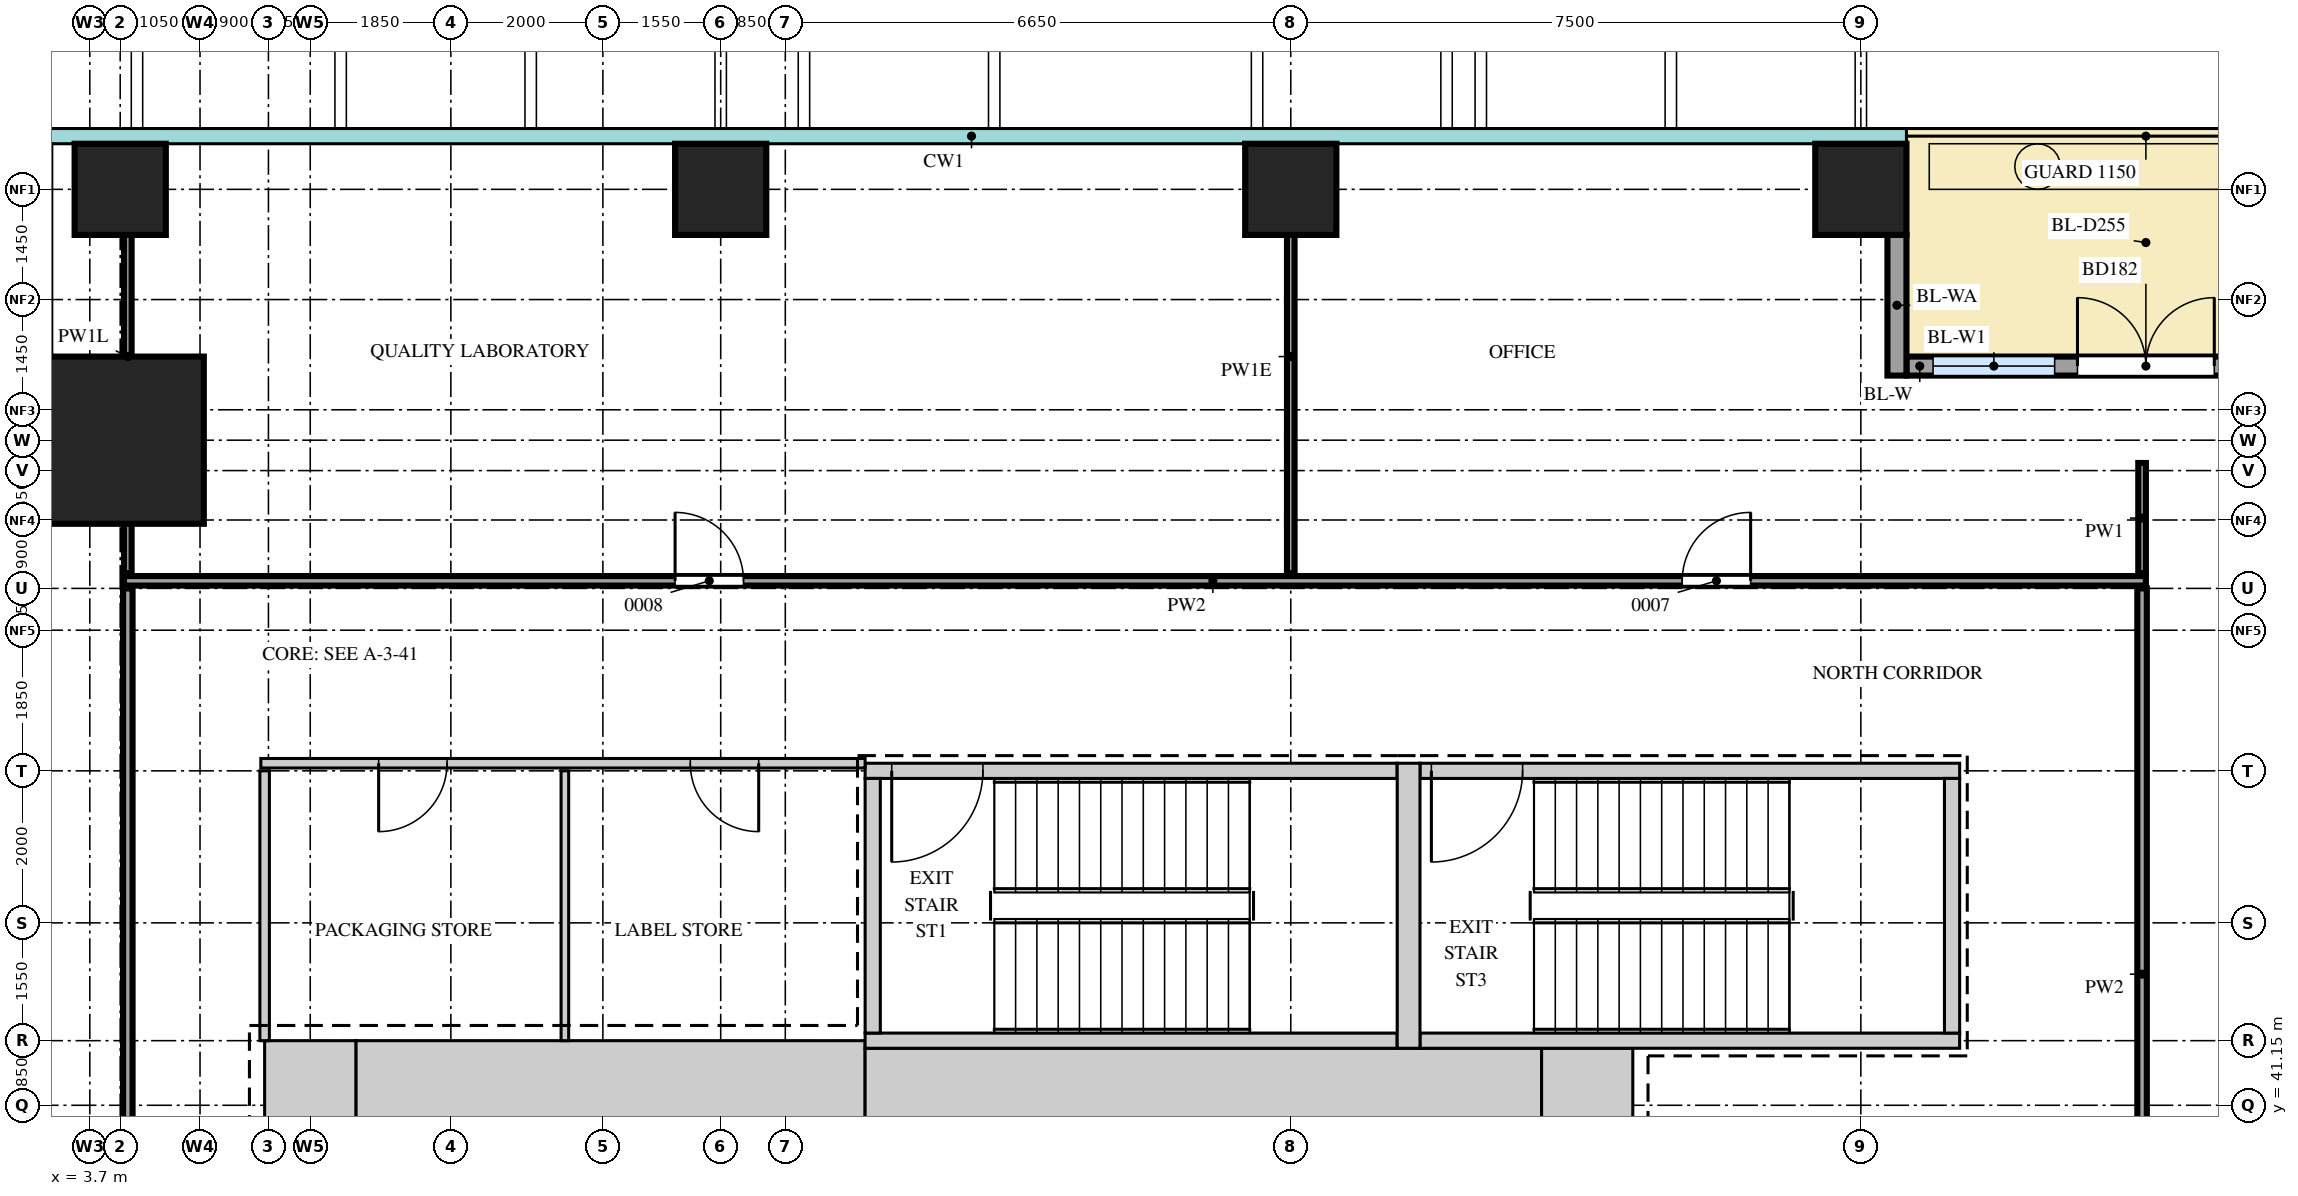
"""IFC4 building model, lengths in metres.
Left out: names, types, materials, properties, quantities, classifications, styles, units other than length and angle.
Written with IfcOpenShell. Run it as: python <this file> out.ifc"""

import sys

from ifc_helpers import new_model, si_unit, direction, frame, frame_2d, origin, origin_2d, place, context, subcontext, project, spatial, rectangle, extrude, source, transform, mapped, element, fill, save


model = new_model("IFC4")
c1 = context("Model", 3, precision=1e-05, world=origin(), true_north=direction((0.0, 1.0)))
c2 = subcontext(c1, "Body", "Model", "MODEL_VIEW")
j1 = project(units=[si_unit("LENGTHUNIT", "METRE"), si_unit("PLANEANGLEUNIT", "RADIAN")], contexts=[c1])
p1 = place(None, origin())
s1 = spatial("IfcSite", under=j1, at=p1, CompositionType="ELEMENT")
p2 = place(p1, origin())
s2 = spatial("IfcBuilding", under=s1, at=p2, CompositionType="ELEMENT")
p3 = place(p2, frame((0.0, 0.0, 87.0)))
s3 = spatial("IfcBuildingStorey", under=s2, at=p3, CompositionType="ELEMENT", Elevation=87.0)
m1 = source(origin(), c2, "Body", "SweptSolid", [
    extrude(rectangle(XDim=6.7, YDim=1.2, at=frame_2d((3.35, 0.0))), origin(), (0.0, 0.0, 1.0), 4.2),
])
p4 = place(p3, frame((7.2, 41.4, 0.0), z_axis=(0.0, 0.0, 1.0), x_axis=(1.0, 0.0, 0.0)))
e1 = element("IfcWall", 1, at=p4, inside=s3, PredefinedType="SHEAR", context=c2, shape_type="MappedRepresentation", body=[
    mapped(m1, transform((0.0, 0.0, 0.0))),
])
m2 = source(origin(), c2, "Body", "SweptSolid", [
    extrude(rectangle(XDim=8.9, YDim=1.1, at=frame_2d((4.45, 0.0))), origin(), (0.0, 0.0, 1.0), 4.2),
])
p5 = place(p3, frame((13.9, 41.35, 0.0), z_axis=(0.0, 0.0, 1.0), x_axis=(1.0, 0.0, 0.0)))
e2 = element("IfcWall", 2, at=p5, inside=s3, PredefinedType="SHEAR", context=c2, shape_type="MappedRepresentation", body=[
    mapped(m2, transform((0.0, 0.0, 0.0))),
])
m3 = source(origin(), c2, "Body", "SweptSolid", [
    extrude(rectangle(XDim=1.2, YDim=1.1, at=frame_2d((0.6, 0.0))), origin(), (0.0, 0.0, 1.0), 4.2),
])
p6 = place(p3, frame((22.8, 41.35, 0.0), z_axis=(0.0, 0.0, 1.0), x_axis=(1.0, 0.0, 0.0)))
e3 = element("IfcWall", 3, at=p6, inside=s3, PredefinedType="SHEAR", context=c2, shape_type="MappedRepresentation", body=[
    mapped(m3, transform((0.0, 0.0, 0.0))),
])
m4 = source(origin(), c2, "Body", "SweptSolid", [
    extrude(rectangle(XDim=1.2, YDim=1.2, at=frame_2d((0.6, 0.0))), origin(), (0.0, 0.0, 1.0), 4.2),
])
p7 = place(p3, frame((6.0, 41.4, 0.0), z_axis=(0.0, 0.0, 1.0), x_axis=(1.0, 0.0, 0.0)))
e4 = element("IfcWall", 4, at=p7, inside=s3, PredefinedType="SHEAR", context=c2, shape_type="MappedRepresentation", body=[
    mapped(m4, transform((0.0, 0.0, 0.0))),
])
m5 = source(origin(), c2, "Body", "SweptSolid", [
    extrude(rectangle(XDim=7.0, YDim=0.2, at=frame_2d((3.5, 0.0))), origin(), (0.0, 0.0, 1.0), 4.2),
])
p8 = place(p3, frame((13.9, 45.55, 0.0), z_axis=(0.0, 0.0, 1.0), x_axis=(1.0, 0.0, 0.0)))
e5 = element("IfcWall", 5, at=p8, inside=s3, PredefinedType="SHEAR", context=c2, shape_type="MappedRepresentation", body=[
    mapped(m5, transform((0.0, 0.0, 0.0))),
])
m6 = source(origin(), c2, "Body", "SweptSolid", [
    extrude(rectangle(XDim=1.2, YDim=2.1, at=frame_2d((0.6, 1.05))), frame((0.0, 0.11, 0.0), z_axis=(0.0, -1.0, 0.0), x_axis=(1.0, 0.0, 0.0)), (0.0, 0.0, 1.0), 0.22),
])
p9 = place(p8, frame((0.35, 0.0, 0.0)))
e6 = element("IfcOpeningElement", 6, at=p9, cuts=e5, PredefinedType="OPENING", context=c2, shape_type="MappedRepresentation", body=[
    mapped(m6, transform((0.0, 0.0, 0.0))),
])
p10 = place(p3, frame((13.9, 42.0, 0.0), z_axis=(0.0, 0.0, 1.0), x_axis=(1.0, 0.0, 0.0)))
e7 = element("IfcWall", 7, at=p10, inside=s3, PredefinedType="SHEAR", context=c2, shape_type="MappedRepresentation", body=[
    mapped(m5, transform((0.0, 0.0, 0.0))),
])
m7 = source(origin(), c2, "Body", "SweptSolid", [
    extrude(rectangle(XDim=7.1, YDim=0.2, at=frame_2d((3.55, 0.0))), origin(), (0.0, 0.0, 1.0), 4.2),
])
p11 = place(p3, frame((21.2, 45.55, 0.0), z_axis=(0.0, 0.0, 1.0), x_axis=(1.0, 0.0, 0.0)))
e8 = element("IfcWall", 8, at=p11, inside=s3, PredefinedType="SHEAR", context=c2, shape_type="MappedRepresentation", body=[
    mapped(m7, transform((0.0, 0.0, 0.0))),
])
p12 = place(p11, frame((0.15, 0.0, 0.0)))
e9 = element("IfcOpeningElement", 9, at=p12, cuts=e8, PredefinedType="OPENING", context=c2, shape_type="MappedRepresentation", body=[
    mapped(m6, transform((0.0, 0.0, 0.0))),
])
p13 = place(p3, frame((21.2, 42.0, 0.0), z_axis=(0.0, 0.0, 1.0), x_axis=(1.0, 0.0, 0.0)))
e10 = element("IfcWall", 10, at=p13, inside=s3, PredefinedType="SHEAR", context=c2, shape_type="MappedRepresentation", body=[
    mapped(m7, transform((0.0, 0.0, 0.0))),
])
m8 = source(origin(), c2, "Body", "SweptSolid", [
    extrude(rectangle(XDim=3.75, YDim=0.3, at=frame_2d((1.875, 0.0))), origin(), (0.0, 0.0, 1.0), 4.2),
])
p14 = place(p3, frame((21.05, 41.9, 0.0), z_axis=(0.0, 0.0, 1.0), x_axis=(0.0, 1.0, 0.0)))
e11 = element("IfcWall", 11, at=p14, inside=s3, PredefinedType="SHEAR", context=c2, shape_type="MappedRepresentation", body=[
    mapped(m8, transform((0.0, 0.0, 0.0))),
])
m9 = source(origin(), c2, "Body", "SweptSolid", [
    extrude(rectangle(XDim=3.35, YDim=0.2, at=frame_2d((1.675, 0.0))), origin(), (0.0, 0.0, 1.0), 4.2),
])
for number, where, z_axis, x_axis in (
    (12, (14.0, 42.1, 0.0), (0.0, 0.0, 1.0), (0.0, 1.0, 0.0)),
    (13, (28.2, 42.1, 0.0), (0.0, 0.0, 1.0), (0.0, 1.0, 0.0)),
):
    element("IfcWall", number, at=place(p3, frame(where, z_axis=z_axis, x_axis=x_axis)), inside=s3, PredefinedType="SHEAR", context=c2, shape_type="MappedRepresentation", body=[
        mapped(m9, transform((0.0, 0.0, 0.0))),
    ])
m10 = source(origin(), c2, "Body", "SweptSolid", [
    extrude(rectangle(XDim=2.2, YDim=2.2, at=origin_2d()), origin(), (0.0, 0.0, 1.0), 4.5),
])
p15 = place(p3, frame((4.1, 49.9, 0.0), z_axis=(0.0, 0.0, 1.0), x_axis=(1.0, 0.0, 0.0)))
e14 = element("IfcColumn", 14, at=p15, inside=s3, PredefinedType="COLUMN", context=c2, shape_type="MappedRepresentation", body=[
    mapped(m10, transform((0.0, 0.0, 0.0))),
])
m11 = source(origin(), c2, "Body", "SweptSolid", [
    extrude(rectangle(XDim=1.2, YDim=1.2, at=origin_2d()), origin(), (0.0, 0.0, 1.0), 4.2),
])
for number, where, z_axis, x_axis in (
    (15, (4.1, 53.2, 0.0), (0.0, 0.0, 1.0), (1.0, 0.0, 0.0)),
    (16, (12.0, 53.2, 0.0), (0.0, 0.0, 1.0), (1.0, 0.0, 0.0)),
    (17, (19.5, 53.2, 0.0), (0.0, 0.0, 1.0), (1.0, 0.0, 0.0)),
    (18, (27.0, 53.2, 0.0), (0.0, 0.0, 1.0), (1.0, 0.0, 0.0)),
):
    element("IfcColumn", number, at=place(p3, frame(where, z_axis=z_axis, x_axis=x_axis)), inside=s3, PredefinedType="COLUMN", context=c2, shape_type="MappedRepresentation", body=[
        mapped(m11, transform((0.0, 0.0, 0.0))),
    ])
m12 = source(origin(), c2, "Body", "SweptSolid", [
    extrude(rectangle(XDim=6.3, YDim=0.25, at=frame_2d((3.15, 0.0))), origin(), (0.0, 0.0, 1.0), 4.2),
])
p16 = place(p3, frame((27.6, 50.875, 0.0), z_axis=(0.0, 0.0, 1.0), x_axis=(1.0, 0.0, 0.0)))
e19 = element("IfcWall", 19, at=p16, inside=s3, PredefinedType="SOLIDWALL", context=c2, shape_type="MappedRepresentation", body=[
    mapped(m12, transform((0.0, 0.0, 0.0))),
])
m13 = source(origin(), c2, "Body", "SweptSolid", [
    extrude(rectangle(XDim=1.6, YDim=2.4, at=frame_2d((0.8, 1.2))), frame((0.0, 0.135, 0.0), z_axis=(0.0, -1.0, 0.0), x_axis=(1.0, 0.0, 0.0)), (0.0, 0.0, 1.0), 0.27),
])
p17 = place(p16, frame((0.35, 0.0, 0.0)))
e20 = element("IfcOpeningElement", 20, at=p17, cuts=e19, PredefinedType="OPENING", context=c2, shape_type="MappedRepresentation", body=[
    mapped(m13, transform((0.0, 0.0, 0.0))),
])
p18 = place(p16, frame((4.35, 0.0, 0.0)))
e21 = element("IfcOpeningElement", 21, at=p18, cuts=e19, PredefinedType="OPENING", context=c2, shape_type="MappedRepresentation", body=[
    mapped(m13, transform((0.0, 0.0, 0.0))),
])
m14 = source(origin(), c2, "Body", "SweptSolid", [
    extrude(rectangle(XDim=1.8, YDim=2.4, at=frame_2d((0.9, 1.2))), frame((0.0, 0.135, 0.0), z_axis=(0.0, -1.0, 0.0), x_axis=(1.0, 0.0, 0.0)), (0.0, 0.0, 1.0), 0.27),
])
p19 = place(p16, frame((2.25, 0.0, 0.0)))
e22 = element("IfcOpeningElement", 22, at=p19, cuts=e19, PredefinedType="OPENING", context=c2, shape_type="MappedRepresentation", body=[
    mapped(m14, transform((0.0, 0.0, 0.0))),
])
m15 = source(origin(), c2, "Body", "SweptSolid", [
    extrude(rectangle(XDim=1.85, YDim=0.25, at=frame_2d((0.925, 0.0))), origin(), (0.0, 0.0, 1.0), 3.9),
])
p20 = place(p3, frame((27.475, 52.6, 0.0), z_axis=(0.0, 0.0, 1.0), x_axis=(0.0, -1.0, 0.0)))
e23 = element("IfcWall", 23, at=p20, inside=s3, PredefinedType="SOLIDWALL", context=c2, shape_type="MappedRepresentation", body=[
    mapped(m15, transform((0.0, 0.0, 0.0))),
])
m16 = source(origin(), c2, "Body", "SweptSolid", [
    extrude(rectangle(XDim=41.8, YDim=0.125, at=frame_2d((20.9, 0.0))), origin(), (0.0, 0.0, 1.0), 4.3),
])
p21 = place(p3, frame((4.2, 6.15, 0.0), z_axis=(0.0, 0.0, 1.0), x_axis=(0.0, 1.0, 0.0)))
e24 = element("IfcWall", 24, at=p21, inside=s3, PredefinedType="PARTITIONING", context=c2, shape_type="MappedRepresentation", body=[
    mapped(m16, transform((0.0, 0.0, 0.0))),
])
m17 = source(origin(), c2, "Body", "SweptSolid", [
    extrude(rectangle(XDim=1.2, YDim=2.1, at=frame_2d((0.6, 1.05))), frame((0.0, 0.073, 0.0), z_axis=(0.0, -1.0, 0.0), x_axis=(1.0, 0.0, 0.0)), (0.0, 0.0, 1.0), 0.145),
])
p22 = place(p21, frame((7.45, 0.0, 0.0)))
e25 = element("IfcOpeningElement", 25, at=p22, cuts=e24, PredefinedType="OPENING", context=c2, shape_type="MappedRepresentation", body=[
    mapped(m17, transform((0.0, 0.0, 0.0))),
])
p23 = place(p21, frame((26.05, 0.0, 0.0)))
e26 = element("IfcOpeningElement", 26, at=p23, cuts=e24, PredefinedType="OPENING", context=c2, shape_type="MappedRepresentation", body=[
    mapped(m17, transform((0.0, 0.0, 0.0))),
])
m18 = source(origin(), c2, "Body", "SweptSolid", [
    extrude(rectangle(XDim=10.15, YDim=0.125, at=frame_2d((5.075, 0.0))), origin(), (0.0, 0.0, 1.0), 4.3),
])
p24 = place(p3, frame((30.7, 37.8, 0.0), z_axis=(0.0, 0.0, 1.0), x_axis=(0.0, 1.0, 0.0)))
e27 = element("IfcWall", 27, at=p24, inside=s3, PredefinedType="PARTITIONING", context=c2, shape_type="MappedRepresentation", body=[
    mapped(m18, transform((0.0, 0.0, 0.0))),
])
m19 = source(origin(), c2, "Body", "SweptSolid", [
    extrude(rectangle(XDim=3.55, YDim=0.125, at=frame_2d((1.775, 0.0))), origin(), (0.0, 0.0, 1.0), 4.3),
])
p25 = place(p3, frame((6.0, 42.0, 0.0), z_axis=(0.0, 0.0, 1.0), x_axis=(0.0, 1.0, 0.0)))
e28 = element("IfcWall", 28, at=p25, inside=s3, PredefinedType="PARTITIONING", context=c2, shape_type="MappedRepresentation", body=[
    mapped(m19, transform((0.0, 0.0, 0.0))),
])
m20 = source(origin(), c2, "Body", "SweptSolid", [
    extrude(rectangle(XDim=3.55, YDim=0.1, at=frame_2d((1.775, 0.0))), origin(), (0.0, 0.0, 1.0), 4.3),
])
p26 = place(p3, frame((9.95, 42.0, 0.0), z_axis=(0.0, 0.0, 1.0), x_axis=(0.0, 1.0, 0.0)))
e29 = element("IfcWall", 29, at=p26, inside=s3, PredefinedType="PARTITIONING", context=c2, shape_type="MappedRepresentation", body=[
    mapped(m20, transform((0.0, 0.0, 0.0))),
])
m21 = source(origin(), c2, "Body", "SweptSolid", [
    extrude(rectangle(XDim=7.95, YDim=0.125, at=frame_2d((3.975, 0.0))), origin(), (0.0, 0.0, 1.0), 4.3),
])
p27 = place(p3, frame((5.95, 45.65, 0.0), z_axis=(0.0, 0.0, 1.0), x_axis=(1.0, 0.0, 0.0)))
e30 = element("IfcWall", 30, at=p27, inside=s3, PredefinedType="PARTITIONING", context=c2, shape_type="MappedRepresentation", body=[
    mapped(m21, transform((0.0, 0.0, 0.0))),
])
m22 = source(origin(), c2, "Body", "SweptSolid", [
    extrude(rectangle(XDim=0.9, YDim=2.1, at=frame_2d((0.45, 1.05))), frame((0.0, 0.073, 0.0), z_axis=(0.0, -1.0, 0.0), x_axis=(1.0, 0.0, 0.0)), (0.0, 0.0, 1.0), 0.145),
])
p28 = place(p27, frame((1.55, 0.0, 0.0)))
e31 = element("IfcOpeningElement", 31, at=p28, cuts=e30, PredefinedType="OPENING", context=c2, shape_type="MappedRepresentation", body=[
    mapped(m22, transform((0.0, 0.0, 0.0))),
])
p29 = place(p27, frame((5.65, 0.0, 0.0)))
e32 = element("IfcOpeningElement", 32, at=p29, cuts=e30, PredefinedType="OPENING", context=c2, shape_type="MappedRepresentation", body=[
    mapped(m22, transform((0.0, 0.0, 0.0))),
])
m23 = source(origin(), c2, "Body", "SweptSolid", [
    extrude(rectangle(XDim=26.6, YDim=0.125, at=frame_2d((13.3, 0.0))), origin(), (0.0, 0.0, 1.0), 4.3),
])
p30 = place(p3, frame((4.15, 48.05, 0.0), z_axis=(0.0, 0.0, 1.0), x_axis=(1.0, 0.0, 0.0)))
e33 = element("IfcWall", 33, at=p30, inside=s3, PredefinedType="PARTITIONING", context=c2, shape_type="MappedRepresentation", body=[
    mapped(m23, transform((0.0, 0.0, 0.0))),
])
p31 = place(p30, frame((7.25, 0.0, 0.0)))
e34 = element("IfcOpeningElement", 34, at=p31, cuts=e33, PredefinedType="OPENING", context=c2, shape_type="MappedRepresentation", body=[
    mapped(m22, transform((0.0, 0.0, 0.0))),
])
p32 = place(p30, frame((20.5, 0.0, 0.0)))
e35 = element("IfcOpeningElement", 35, at=p32, cuts=e33, PredefinedType="OPENING", context=c2, shape_type="MappedRepresentation", body=[
    mapped(m22, transform((0.0, 0.0, 0.0))),
])
m24 = source(origin(), c2, "Body", "SweptSolid", [
    extrude(rectangle(XDim=5.7, YDim=0.1, at=frame_2d((2.85, 0.0))), origin(), (0.0, 0.0, 1.0), 3.6),
])
p33 = place(p3, frame((4.2, 48.15, 0.0), z_axis=(0.0, 0.0, 1.0), x_axis=(0.0, 1.0, 0.0)))
e36 = element("IfcWall", 36, at=p33, inside=s3, PredefinedType="PARTITIONING", context=c2, shape_type="MappedRepresentation", body=[
    mapped(m24, transform((0.0, 0.0, 0.0))),
])
m25 = source(origin(), c2, "Body", "SweptSolid", [
    extrude(rectangle(XDim=5.7, YDim=0.1, at=frame_2d((2.85, 0.0))), origin(), (0.0, 0.0, 1.0), 3.84),
])
p34 = place(p3, frame((19.5, 48.15, 0.0), z_axis=(0.0, 0.0, 1.0), x_axis=(0.0, 1.0, 0.0)))
e37 = element("IfcWall", 37, at=p34, inside=s3, PredefinedType="PARTITIONING", context=c2, shape_type="MappedRepresentation", body=[
    mapped(m25, transform((0.0, 0.0, 0.0))),
])
m26 = source(origin(), c2, "Body", "SweptSolid", [
    extrude(rectangle(XDim=1.45, YDim=0.1, at=frame_2d((0.725, 0.0))), origin(), (0.0, 0.0, 1.0), 4.3),
])
p35 = place(p3, frame((30.7, 48.15, 0.0), z_axis=(0.0, 0.0, 1.0), x_axis=(0.0, 1.0, 0.0)))
e38 = element("IfcWall", 38, at=p35, inside=s3, PredefinedType="PARTITIONING", context=c2, shape_type="MappedRepresentation", body=[
    mapped(m26, transform((0.0, 0.0, 0.0))),
])
m27 = source(origin(), c2, "Body", "SweptSolid", [
    extrude(rectangle(XDim=1.6, YDim=2.4, at=frame_2d((0.8, 1.2))), frame((0.0, 0.03, 0.0), z_axis=(0.0, -1.0, 0.0), x_axis=(1.0, 0.0, 0.0)), (0.0, 0.0, 1.0), 0.06),
])
p36 = place(p17, origin())
e39 = element("IfcWindow", 39, at=p36, inside=s3, PartitioningType="SINGLE_PANEL", PredefinedType="WINDOW", context=c2, shape_type="MappedRepresentation", body=[
    mapped(m27, transform((0.0, 0.0, 0.0))),
])
fill(e20, e39)
m28 = source(origin(), c2, "Body", "SweptSolid", [
    extrude(rectangle(XDim=1.8, YDim=2.4, at=frame_2d((0.9, 1.2))), frame((0.0, 0.025, 0.0), z_axis=(0.0, -1.0, 0.0), x_axis=(1.0, 0.0, 0.0)), (0.0, 0.0, 1.0), 0.05),
])
p37 = place(p19, origin())
e40 = element("IfcDoor", 40, at=p37, inside=s3, OperationType="DOUBLE_DOOR_DOUBLE_SWING", PredefinedType="DOOR", context=c2, shape_type="MappedRepresentation", body=[
    mapped(m28, transform((0.0, 0.0, 0.0))),
])
fill(e22, e40)
m29 = source(origin(), c2, "Body", "SweptSolid", [
    extrude(rectangle(XDim=0.9, YDim=2.1, at=frame_2d((0.45, 1.05))), frame((0.0, 0.025, 0.0), z_axis=(0.0, -1.0, 0.0), x_axis=(1.0, 0.0, 0.0)), (0.0, 0.0, 1.0), 0.05),
])
p38 = place(p31, origin())
e41 = element("IfcDoor", 41, at=p38, inside=s3, OperationType="SINGLE_SWING_RIGHT", PredefinedType="DOOR", context=c2, shape_type="MappedRepresentation", body=[
    mapped(m29, transform((0.0, 0.0, 0.0))),
])
fill(e34, e41)
p39 = place(p32, origin())
e42 = element("IfcDoor", 42, at=p39, inside=s3, OperationType="SINGLE_SWING_LEFT", PredefinedType="DOOR", context=c2, shape_type="MappedRepresentation", body=[
    mapped(m29, transform((0.0, 0.0, 0.0))),
])
fill(e35, e42)
p40 = place(p28, origin())
e43 = element("IfcDoor", 43, at=p40, inside=s3, OperationType="SINGLE_SWING_LEFT", PredefinedType="DOOR", context=c2, shape_type="MappedRepresentation", body=[
    mapped(m29, transform((0.0, 0.0, 0.0))),
])
fill(e31, e43)
p41 = place(p29, origin())
e44 = element("IfcDoor", 44, at=p41, inside=s3, OperationType="SINGLE_SWING_RIGHT", PredefinedType="DOOR", context=c2, shape_type="MappedRepresentation", body=[
    mapped(m29, transform((0.0, 0.0, 0.0))),
])
fill(e32, e44)
m30 = source(origin(), c2, "Body", "SweptSolid", [
    extrude(rectangle(XDim=1.2, YDim=2.1, at=frame_2d((0.6, 1.05))), frame((0.0, 0.025, 0.0), z_axis=(0.0, -1.0, 0.0), x_axis=(1.0, 0.0, 0.0)), (0.0, 0.0, 1.0), 0.05),
])
p42 = place(p9, origin())
e45 = element("IfcDoor", 45, at=p42, inside=s3, OperationType="SINGLE_SWING_LEFT", PredefinedType="DOOR", context=c2, shape_type="MappedRepresentation", body=[
    mapped(m30, transform((0.0, 0.0, 0.0))),
])
fill(e6, e45)
p43 = place(p12, origin())
e46 = element("IfcDoor", 46, at=p43, inside=s3, OperationType="SINGLE_SWING_LEFT", PredefinedType="DOOR", context=c2, shape_type="MappedRepresentation", body=[
    mapped(m30, transform((0.0, 0.0, 0.0))),
])
fill(e9, e46)
save(model, sys.argv[1])
